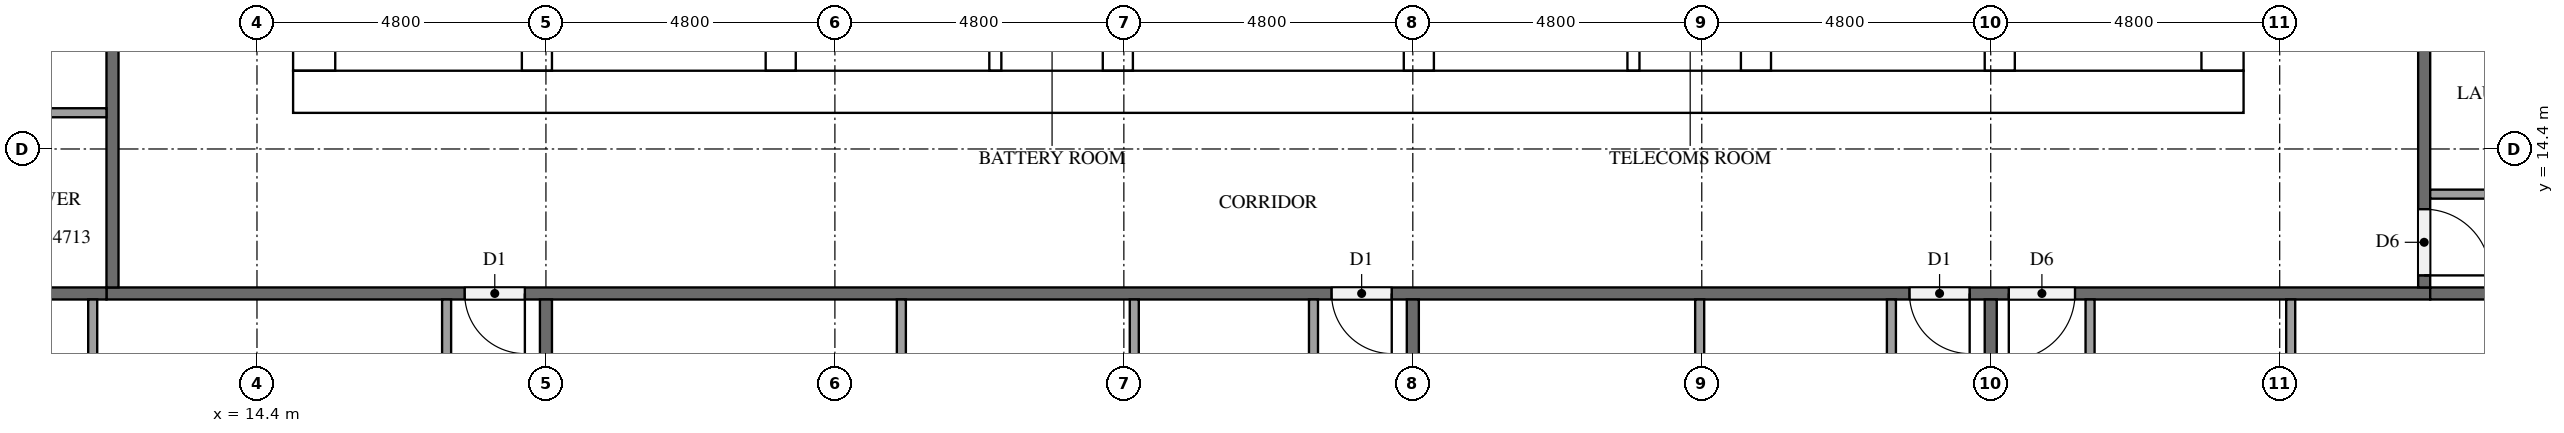
"""IFC4 building model, lengths in metres.
Left out: names, types, materials, properties, quantities, classifications, styles, units other than length and angle.
Written with IfcOpenShell. Run it as: python <this file> out.ifc"""

import sys

from ifc_helpers import new_model, si_unit, direction, frame, frame_2d, origin, place, context, subcontext, project, spatial, rectangle, extrude, element, fill, save


model = new_model("IFC4")
c1 = context("Model", 3, precision=1e-05, world=origin(), true_north=direction((0.0, 1.0)))
c2 = subcontext(c1, "Body", "Model", "MODEL_VIEW")
j1 = project(units=[si_unit("LENGTHUNIT", "METRE"), si_unit("PLANEANGLEUNIT", "RADIAN")], contexts=[c1])
p1 = place(None, origin())
s1 = spatial("IfcSite", under=j1, at=p1, CompositionType="ELEMENT")
p2 = place(p1, origin())
s2 = spatial("IfcBuilding", under=s1, at=p2, CompositionType="ELEMENT")
p3 = place(p2, frame((0.0, 0.0, 182.4)))
s3 = spatial("IfcBuildingStorey", under=s2, at=p3, CompositionType="ELEMENT", Elevation=182.4)
p4 = place(p3, frame((15.0, 15.35, 0.0), z_axis=(0.0, 0.0, 1.0), x_axis=(1.0, 0.0, 0.0)))
e1 = element("IfcWall", 1, at=p4, inside=s3, PredefinedType="SHEAR", context=c2, shape_type="SweptSolid", body=[
    extrude(rectangle(XDim=32.4, YDim=0.7, at=frame_2d((16.2, 0.0))), origin(), (0.0, 0.0, 1.0), 3.2),
])
p5 = place(p4, frame((15.3, 0.0, 0.0)))
e2 = element("IfcOpeningElement", 2, at=p5, cuts=e1, PredefinedType="OPENING", context=c2, shape_type="SweptSolid", body=[
    extrude(rectangle(XDim=1.8, YDim=2.1, at=frame_2d((0.9, 1.05))), frame((0.0, 0.36, 0.0), z_axis=(0.0, -1.0, 0.0), x_axis=(1.0, 0.0, 0.0)), (0.0, 0.0, 1.0), 0.72),
])
p6 = place(p3, frame((15.35, 15.7, 0.0), z_axis=(0.0, 0.0, 1.0), x_axis=(0.0, 1.0, 0.0)))
e3 = element("IfcWall", 3, at=p6, inside=s3, PredefinedType="SHEAR", context=c2, shape_type="SweptSolid", body=[
    extrude(rectangle(XDim=21.4, YDim=0.7, at=frame_2d((10.7, 0.0))), origin(), (0.0, 0.0, 1.0), 3.2),
])
p7 = place(p6, frame((5.06, 0.0, 0.0)))
e4 = element("IfcOpeningElement", 4, at=p7, cuts=e3, PredefinedType="OPENING", context=c2, shape_type="SweptSolid", body=[
    extrude(rectangle(XDim=1.2, YDim=2.1, at=frame_2d((0.6, 1.05))), frame((0.0, 0.36, 0.0), z_axis=(0.0, -1.0, 0.0), x_axis=(1.0, 0.0, 0.0)), (0.0, 0.0, 1.0), 0.72),
])
p8 = place(p3, frame((47.05, 15.7, 0.0), z_axis=(0.0, 0.0, 1.0), x_axis=(0.0, 1.0, 0.0)))
e5 = element("IfcWall", 5, at=p8, inside=s3, PredefinedType="SHEAR", context=c2, shape_type="SweptSolid", body=[
    extrude(rectangle(XDim=21.4, YDim=0.7, at=frame_2d((10.7, 0.0))), origin(), (0.0, 0.0, 1.0), 3.2),
])
p9 = place(p8, frame((10.4, 0.0, 0.0)))
e6 = element("IfcOpeningElement", 6, at=p9, cuts=e5, PredefinedType="OPENING", context=c2, shape_type="SweptSolid", body=[
    extrude(rectangle(XDim=1.2, YDim=2.1, at=frame_2d((0.6, 1.05))), frame((0.0, 0.36, 0.0), z_axis=(0.0, -1.0, 0.0), x_axis=(1.0, 0.0, 0.0)), (0.0, 0.0, 1.0), 0.72),
])
p10 = place(p3, frame((19.05, 15.7, 0.0), z_axis=(0.0, 0.0, 1.0), x_axis=(0.0, 1.0, 0.0)))
e7 = element("IfcWall", 7, at=p10, inside=s3, PredefinedType="SHEAR", context=c2, shape_type="SweptSolid", body=[
    extrude(rectangle(XDim=15.3, YDim=0.5, at=frame_2d((7.65, 0.0))), origin(), (0.0, 0.0, 1.0), 3.2),
])
p11 = place(p10, frame((9.75, 0.0, 0.0)))
e8 = element("IfcOpeningElement", 8, at=p11, cuts=e7, PredefinedType="OPENING", context=c2, shape_type="SweptSolid", body=[
    extrude(rectangle(XDim=1.1, YDim=2.1, at=frame_2d((0.55, 1.05))), frame((0.0, 0.26, 0.0), z_axis=(0.0, -1.0, 0.0), x_axis=(1.0, 0.0, 0.0)), (0.0, 0.0, 1.0), 0.52),
])
p12 = place(p10, frame((13.25, 0.0, 0.0)))
e9 = element("IfcOpeningElement", 9, at=p12, cuts=e7, PredefinedType="OPENING", context=c2, shape_type="SweptSolid", body=[
    extrude(rectangle(XDim=1.1, YDim=2.1, at=frame_2d((0.55, 1.05))), frame((0.0, 0.26, 0.0), z_axis=(0.0, -1.0, 0.0), x_axis=(1.0, 0.0, 0.0)), (0.0, 0.0, 1.0), 0.52),
])
p13 = place(p10, frame((0.5, 0.0, 0.0)))
e10 = element("IfcOpeningElement", 10, at=p13, cuts=e7, PredefinedType="OPENING", context=c2, shape_type="SweptSolid", body=[
    extrude(rectangle(XDim=1.2, YDim=2.1, at=frame_2d((0.6, 1.05))), frame((0.0, 0.26, 0.0), z_axis=(0.0, -1.0, 0.0), x_axis=(1.0, 0.0, 0.0)), (0.0, 0.0, 1.0), 0.52),
])
p14 = place(p3, frame((23.1, 15.7, 0.0), z_axis=(0.0, 0.0, 1.0), x_axis=(0.0, 1.0, 0.0)))
e11 = element("IfcWall", 11, at=p14, inside=s3, PredefinedType="SHEAR", context=c2, shape_type="SweptSolid", body=[
    extrude(rectangle(XDim=21.4, YDim=0.5, at=frame_2d((10.7, 0.0))), origin(), (0.0, 0.0, 1.0), 3.2),
])
p15 = place(p3, frame((39.3, 15.7, 0.0), z_axis=(0.0, 0.0, 1.0), x_axis=(0.0, 1.0, 0.0)))
e12 = element("IfcWall", 12, at=p15, inside=s3, PredefinedType="SHEAR", context=c2, shape_type="SweptSolid", body=[
    extrude(rectangle(XDim=8.55, YDim=0.5, at=frame_2d((4.275, 0.0))), origin(), (0.0, 0.0, 1.0), 3.2),
])
p16 = place(p3, frame((43.35, 15.7, 0.0), z_axis=(0.0, 0.0, 1.0), x_axis=(0.0, 1.0, 0.0)))
e13 = element("IfcWall", 13, at=p16, inside=s3, PredefinedType="SHEAR", context=c2, shape_type="SweptSolid", body=[
    extrude(rectangle(XDim=8.55, YDim=0.5, at=frame_2d((4.275, 0.0))), origin(), (0.0, 0.0, 1.0), 3.2),
])
p17 = place(p16, frame((0.5, 0.0, 0.0)))
e14 = element("IfcOpeningElement", 14, at=p17, cuts=e13, PredefinedType="OPENING", context=c2, shape_type="SweptSolid", body=[
    extrude(rectangle(XDim=1.2, YDim=2.1, at=frame_2d((0.6, 1.05))), frame((0.0, 0.26, 0.0), z_axis=(0.0, -1.0, 0.0), x_axis=(1.0, 0.0, 0.0)), (0.0, 0.0, 1.0), 0.52),
])
for number, where, z_axis, x_axis in (
    (15, (28.7, 15.7, 0.0), (0.0, 0.0, 1.0), (0.0, 1.0, 0.0)),
    (16, (33.7, 15.7, 0.0), (0.0, 0.0, 1.0), (0.0, 1.0, 0.0)),
):
    element("IfcWall", number, at=place(p3, frame(where, z_axis=z_axis, x_axis=x_axis)), inside=s3, PredefinedType="SHEAR", context=c2, shape_type="SweptSolid", body=[
        extrude(rectangle(XDim=2.8, YDim=0.5, at=frame_2d((1.4, 0.0))), origin(), (0.0, 0.0, 1.0), 3.2),
    ])
for number, where, z_axis, x_axis in (
    (17, (26.665, 15.7, 0.0), (0.0, 0.0, 1.0), (0.0, 1.0, 0.0)),
    (18, (37.265, 15.7, 0.0), (0.0, 0.0, 1.0), (0.0, 1.0, 0.0)),
):
    element("IfcWall", number, at=place(p3, frame(where, z_axis=z_axis, x_axis=x_axis)), inside=s3, PredefinedType="PARTITIONING", context=c2, shape_type="SweptSolid", body=[
        extrude(rectangle(XDim=2.8, YDim=0.2, at=frame_2d((1.4, 0.0))), origin(), (0.0, 0.0, 1.0), 3.2),
    ])
p18 = place(p3, frame((50.5, 12.0, 0.0), z_axis=(0.0, 0.0, 1.0), x_axis=(-1.0, 0.0, 0.0)))
e19 = element("IfcWall", 19, at=p18, inside=s3, PredefinedType="PARTITIONING", context=c2, shape_type="SweptSolid", body=[
    extrude(rectangle(XDim=38.6, YDim=0.2, at=frame_2d((19.3, 0.0))), origin(), (0.0, 0.0, 1.0), 3.2),
])
p19 = place(p18, frame((31.65, 0.0, 0.0)))
e20 = element("IfcOpeningElement", 20, at=p19, cuts=e19, PredefinedType="OPENING", context=c2, shape_type="SweptSolid", body=[
    extrude(rectangle(XDim=1.0, YDim=2.1, at=frame_2d((0.5, 1.05))), frame((0.0, 0.11, 0.0), z_axis=(0.0, -1.0, 0.0), x_axis=(1.0, 0.0, 0.0)), (0.0, 0.0, 1.0), 0.22),
])
p20 = place(p18, frame((17.25, 0.0, 0.0)))
e21 = element("IfcOpeningElement", 21, at=p20, cuts=e19, PredefinedType="OPENING", context=c2, shape_type="SweptSolid", body=[
    extrude(rectangle(XDim=1.0, YDim=2.1, at=frame_2d((0.5, 1.05))), frame((0.0, 0.11, 0.0), z_axis=(0.0, -1.0, 0.0), x_axis=(1.0, 0.0, 0.0)), (0.0, 0.0, 1.0), 0.22),
])
p21 = place(p18, frame((7.65, 0.0, 0.0)))
e22 = element("IfcOpeningElement", 22, at=p21, cuts=e19, PredefinedType="OPENING", context=c2, shape_type="SweptSolid", body=[
    extrude(rectangle(XDim=1.0, YDim=2.1, at=frame_2d((0.5, 1.05))), frame((0.0, 0.11, 0.0), z_axis=(0.0, -1.0, 0.0), x_axis=(1.0, 0.0, 0.0)), (0.0, 0.0, 1.0), 0.22),
])
p22 = place(p18, frame((5.9, 0.0, 0.0)))
e23 = element("IfcOpeningElement", 23, at=p22, cuts=e19, PredefinedType="OPENING", context=c2, shape_type="SweptSolid", body=[
    extrude(rectangle(XDim=1.1, YDim=2.1, at=frame_2d((0.55, 1.05))), frame((0.0, 0.11, 0.0), z_axis=(0.0, -1.0, 0.0), x_axis=(1.0, 0.0, 0.0)), (0.0, 0.0, 1.0), 0.22),
])
p23 = place(p3, frame((50.4, 40.7, 0.0), z_axis=(0.0, 0.0, 1.0), x_axis=(0.0, -1.0, 0.0)))
e24 = element("IfcWall", 24, at=p23, inside=s3, PredefinedType="PARTITIONING", context=c2, shape_type="SweptSolid", body=[
    extrude(rectangle(XDim=28.6, YDim=0.2, at=frame_2d((14.3, 0.0))), origin(), (0.0, 0.0, 1.0), 3.2),
])
p24 = place(p23, frame((27.3, 0.0, 0.0)))
e25 = element("IfcOpeningElement", 25, at=p24, cuts=e24, PredefinedType="OPENING", context=c2, shape_type="SweptSolid", body=[
    extrude(rectangle(XDim=1.1, YDim=2.1, at=frame_2d((0.55, 1.05))), frame((0.0, 0.11, 0.0), z_axis=(0.0, -1.0, 0.0), x_axis=(1.0, 0.0, 0.0)), (0.0, 0.0, 1.0), 0.22),
])
p25 = place(p23, frame((8.15, 0.0, 0.0)))
e26 = element("IfcOpeningElement", 26, at=p25, cuts=e24, PredefinedType="OPENING", context=c2, shape_type="SweptSolid", body=[
    extrude(rectangle(XDim=1.0, YDim=2.1, at=frame_2d((0.5, 1.05))), frame((0.0, 0.11, 0.0), z_axis=(0.0, -1.0, 0.0), x_axis=(1.0, 0.0, 0.0)), (0.0, 0.0, 1.0), 0.22),
])
p26 = place(p23, frame((0.95, 0.0, 0.0)))
e27 = element("IfcOpeningElement", 27, at=p26, cuts=e24, PredefinedType="OPENING", context=c2, shape_type="SweptSolid", body=[
    extrude(rectangle(XDim=1.0, YDim=2.1, at=frame_2d((0.5, 1.05))), frame((0.0, 0.11, 0.0), z_axis=(0.0, -1.0, 0.0), x_axis=(1.0, 0.0, 0.0)), (0.0, 0.0, 1.0), 0.22),
])
p27 = place(p3, frame((12.0, 12.1, 0.0), z_axis=(0.0, 0.0, 1.0), x_axis=(0.0, 1.0, 0.0)))
e28 = element("IfcWall", 28, at=p27, inside=s3, PredefinedType="PARTITIONING", context=c2, shape_type="SweptSolid", body=[
    extrude(rectangle(XDim=28.6, YDim=0.2, at=frame_2d((14.3, 0.0))), origin(), (0.0, 0.0, 1.0), 3.2),
])
p28 = place(p27, frame((26.65, 0.0, 0.0)))
e29 = element("IfcOpeningElement", 29, at=p28, cuts=e28, PredefinedType="OPENING", context=c2, shape_type="SweptSolid", body=[
    extrude(rectangle(XDim=1.0, YDim=2.1, at=frame_2d((0.5, 1.05))), frame((0.0, 0.11, 0.0), z_axis=(0.0, -1.0, 0.0), x_axis=(1.0, 0.0, 0.0)), (0.0, 0.0, 1.0), 0.22),
])
p29 = place(p27, frame((24.95, 0.0, 0.0)))
e30 = element("IfcOpeningElement", 30, at=p29, cuts=e28, PredefinedType="OPENING", context=c2, shape_type="SweptSolid", body=[
    extrude(rectangle(XDim=1.0, YDim=2.1, at=frame_2d((0.5, 1.05))), frame((0.0, 0.11, 0.0), z_axis=(0.0, -1.0, 0.0), x_axis=(1.0, 0.0, 0.0)), (0.0, 0.0, 1.0), 0.22),
])
p30 = place(p27, frame((12.95, 0.0, 0.0)))
e31 = element("IfcOpeningElement", 31, at=p30, cuts=e28, PredefinedType="OPENING", context=c2, shape_type="SweptSolid", body=[
    extrude(rectangle(XDim=1.0, YDim=2.1, at=frame_2d((0.5, 1.05))), frame((0.0, 0.11, 0.0), z_axis=(0.0, -1.0, 0.0), x_axis=(1.0, 0.0, 0.0)), (0.0, 0.0, 1.0), 0.22),
])
p31 = place(p3, frame((19.2, 11.9, 0.0), z_axis=(0.0, 0.0, 1.0), x_axis=(0.0, -1.0, 0.0)))
e32 = element("IfcWall", 32, at=p31, inside=s3, PredefinedType="PARTITIONING", context=c2, shape_type="SweptSolid", body=[
    extrude(rectangle(XDim=11.575, YDim=0.2, at=frame_2d((5.788, 0.0))), origin(), (0.0, 0.0, 1.0), 3.2),
])
p32 = place(p3, frame((4.9, 12.0, 0.0), z_axis=(0.0, 0.0, 1.0), x_axis=(1.0, 0.0, 0.0)))
e33 = element("IfcWall", 33, at=p32, inside=s3, PredefinedType="PARTITIONING", context=c2, shape_type="SweptSolid", body=[
    extrude(rectangle(XDim=7.0, YDim=0.2, at=frame_2d((3.5, 0.0))), origin(), (0.0, 0.0, 1.0), 3.2),
])
for number, where, z_axis, x_axis in (
    (34, (33.6, 11.9, 0.0), (0.0, 0.0, 1.0), (0.0, -1.0, 0.0)),
    (35, (43.2, 11.9, 0.0), (0.0, 0.0, 1.0), (0.0, -1.0, 0.0)),
):
    element("IfcWall", number, at=place(p3, frame(where, z_axis=z_axis, x_axis=x_axis)), inside=s3, PredefinedType="PARTITIONING", context=c2, shape_type="SweptSolid", body=[
        extrude(rectangle(XDim=11.8, YDim=0.2, at=frame_2d((5.9, 0.0))), origin(), (0.0, 0.0, 1.0), 3.2),
    ])
p33 = place(p3, frame((50.5, 12.0, 0.0), z_axis=(0.0, 0.0, 1.0), x_axis=(1.0, 0.0, 0.0)))
e36 = element("IfcWall", 36, at=p33, inside=s3, PredefinedType="PARTITIONING", context=c2, shape_type="SweptSolid", body=[
    extrude(rectangle(XDim=11.8, YDim=0.2, at=frame_2d((5.9, 0.0))), origin(), (0.0, 0.0, 1.0), 3.2),
])
p34 = place(p3, frame((11.671, 11.9, 0.0), z_axis=(0.0, 0.0, 1.0), x_axis=(0.0, -1.0, 0.0)))
e37 = element("IfcWall", 37, at=p34, inside=s3, PredefinedType="PARTITIONING", context=c2, shape_type="SweptSolid", body=[
    extrude(rectangle(XDim=4.325, YDim=0.15, at=frame_2d((2.163, 0.0))), origin(), (0.0, 0.0, 1.0), 3.2),
])
p35 = place(p3, frame((17.55, 11.9, 0.0), z_axis=(0.0, 0.0, 1.0), x_axis=(0.0, -1.0, 0.0)))
e38 = element("IfcWall", 38, at=p35, inside=s3, PredefinedType="PARTITIONING", context=c2, shape_type="SweptSolid", body=[
    extrude(rectangle(XDim=4.475, YDim=0.15, at=frame_2d((2.237, 0.0))), origin(), (0.0, 0.0, 1.0), 3.2),
])
for number, where, z_axis, x_axis in (
    (39, (28.973, 11.9, 0.0), (0.0, 0.0, 1.0), (0.0, -1.0, 0.0)),
    (40, (25.104, 11.9, 0.0), (0.0, 0.0, 1.0), (0.0, -1.0, 0.0)),
):
    element("IfcWall", number, at=place(p3, frame(where, z_axis=z_axis, x_axis=x_axis)), inside=s3, PredefinedType="PARTITIONING", context=c2, shape_type="SweptSolid", body=[
        extrude(rectangle(XDim=3.575, YDim=0.15, at=frame_2d((1.788, 0.0))), origin(), (0.0, 0.0, 1.0), 3.2),
    ])
for number, where, z_axis, x_axis in (
    (41, (31.95, 11.9, 0.0), (0.0, 0.0, 1.0), (0.0, -1.0, 0.0)),
    (42, (38.365, 11.9, 0.0), (0.0, 0.0, 1.0), (0.0, -1.0, 0.0)),
):
    element("IfcWall", number, at=place(p3, frame(where, z_axis=z_axis, x_axis=x_axis)), inside=s3, PredefinedType="PARTITIONING", context=c2, shape_type="SweptSolid", body=[
        extrude(rectangle(XDim=3.725, YDim=0.15, at=frame_2d((1.862, 0.0))), origin(), (0.0, 0.0, 1.0), 3.2),
    ])
p36 = place(p3, frame((41.55, 11.9, 0.0), z_axis=(0.0, 0.0, 1.0), x_axis=(0.0, -1.0, 0.0)))
e43 = element("IfcWall", 43, at=p36, inside=s3, PredefinedType="PARTITIONING", context=c2, shape_type="SweptSolid", body=[
    extrude(rectangle(XDim=3.875, YDim=0.15, at=frame_2d((1.938, 0.0))), origin(), (0.0, 0.0, 1.0), 3.2),
])
p37 = place(p3, frame((48.183, 11.9, 0.0), z_axis=(0.0, 0.0, 1.0), x_axis=(0.0, -1.0, 0.0)))
e44 = element("IfcWall", 44, at=p37, inside=s3, PredefinedType="PARTITIONING", context=c2, shape_type="SweptSolid", body=[
    extrude(rectangle(XDim=4.325, YDim=0.15, at=frame_2d((2.163, 0.0))), origin(), (0.0, 0.0, 1.0), 3.2),
])
p38 = place(p3, frame((44.85, 11.9, 0.0), z_axis=(0.0, 0.0, 1.0), x_axis=(0.0, -1.0, 0.0)))
e45 = element("IfcWall", 45, at=p38, inside=s3, PredefinedType="PARTITIONING", context=c2, shape_type="SweptSolid", body=[
    extrude(rectangle(XDim=4.475, YDim=0.15, at=frame_2d((2.237, 0.0))), origin(), (0.0, 0.0, 1.0), 3.2),
])
p39 = place(p3, frame((50.5, 13.65, 0.0), z_axis=(0.0, 0.0, 1.0), x_axis=(1.0, 0.0, 0.0)))
e46 = element("IfcWall", 46, at=p39, inside=s3, PredefinedType="PARTITIONING", context=c2, shape_type="SweptSolid", body=[
    extrude(rectangle(XDim=3.275, YDim=0.15, at=frame_2d((1.637, 0.0))), origin(), (0.0, 0.0, 1.0), 3.2),
])
p40 = place(p3, frame((11.9, 15.002, 0.0), z_axis=(0.0, 0.0, 1.0), x_axis=(-1.0, 0.0, 0.0)))
e47 = element("IfcWall", 47, at=p40, inside=s3, PredefinedType="PARTITIONING", context=c2, shape_type="SweptSolid", body=[
    extrude(rectangle(XDim=2.225, YDim=0.15, at=frame_2d((1.112, 0.0))), origin(), (0.0, 0.0, 1.0), 3.2),
])
p41 = place(p5, frame((1.8, 0.0, 0.0), z_axis=(0.0, 0.0, 1.0), x_axis=(-1.0, 0.0, 0.0)))
e48 = element("IfcDoor", 48, at=p41, inside=s3, OperationType="DOUBLE_DOOR_SINGLE_SWING", PredefinedType="DOOR", context=c2, shape_type="SweptSolid", body=[
    extrude(rectangle(XDim=1.8, YDim=2.1, at=frame_2d((0.9, 1.05))), frame((0.0, 0.025, 0.0), z_axis=(0.0, -1.0, 0.0), x_axis=(1.0, 0.0, 0.0)), (0.0, 0.0, 1.0), 0.05),
])
fill(e2, e48)
p42 = place(p19, origin())
e49 = element("IfcDoor", 49, at=p42, inside=s3, OperationType="SINGLE_SWING_LEFT", PredefinedType="DOOR", context=c2, shape_type="SweptSolid", body=[
    extrude(rectangle(XDim=1.0, YDim=2.1, at=frame_2d((0.5, 1.05))), frame((0.0, 0.025, 0.0), z_axis=(0.0, -1.0, 0.0), x_axis=(1.0, 0.0, 0.0)), (0.0, 0.0, 1.0), 0.05),
])
fill(e20, e49)
p43 = place(p20, origin())
e50 = element("IfcDoor", 50, at=p43, inside=s3, OperationType="SINGLE_SWING_LEFT", PredefinedType="DOOR", context=c2, shape_type="SweptSolid", body=[
    extrude(rectangle(XDim=1.0, YDim=2.1, at=frame_2d((0.5, 1.05))), frame((0.0, 0.025, 0.0), z_axis=(0.0, -1.0, 0.0), x_axis=(1.0, 0.0, 0.0)), (0.0, 0.0, 1.0), 0.05),
])
fill(e21, e50)
p44 = place(p21, origin())
e51 = element("IfcDoor", 51, at=p44, inside=s3, OperationType="SINGLE_SWING_LEFT", PredefinedType="DOOR", context=c2, shape_type="SweptSolid", body=[
    extrude(rectangle(XDim=1.0, YDim=2.1, at=frame_2d((0.5, 1.05))), frame((0.0, 0.025, 0.0), z_axis=(0.0, -1.0, 0.0), x_axis=(1.0, 0.0, 0.0)), (0.0, 0.0, 1.0), 0.05),
])
fill(e22, e51)
p45 = place(p22, origin())
e52 = element("IfcDoor", 52, at=p45, inside=s3, OperationType="SINGLE_SWING_RIGHT", PredefinedType="DOOR", context=c2, shape_type="SweptSolid", body=[
    extrude(rectangle(XDim=1.1, YDim=2.1, at=frame_2d((0.55, 1.05))), frame((0.0, 0.025, 0.0), z_axis=(0.0, -1.0, 0.0), x_axis=(1.0, 0.0, 0.0)), (0.0, 0.0, 1.0), 0.05),
])
fill(e23, e52)
p46 = place(p24, origin())
e53 = element("IfcDoor", 53, at=p46, inside=s3, OperationType="SINGLE_SWING_RIGHT", PredefinedType="DOOR", context=c2, shape_type="SweptSolid", body=[
    extrude(rectangle(XDim=1.1, YDim=2.1, at=frame_2d((0.55, 1.05))), frame((0.0, 0.025, 0.0), z_axis=(0.0, -1.0, 0.0), x_axis=(1.0, 0.0, 0.0)), (0.0, 0.0, 1.0), 0.05),
])
fill(e25, e53)
save(model, sys.argv[1])
